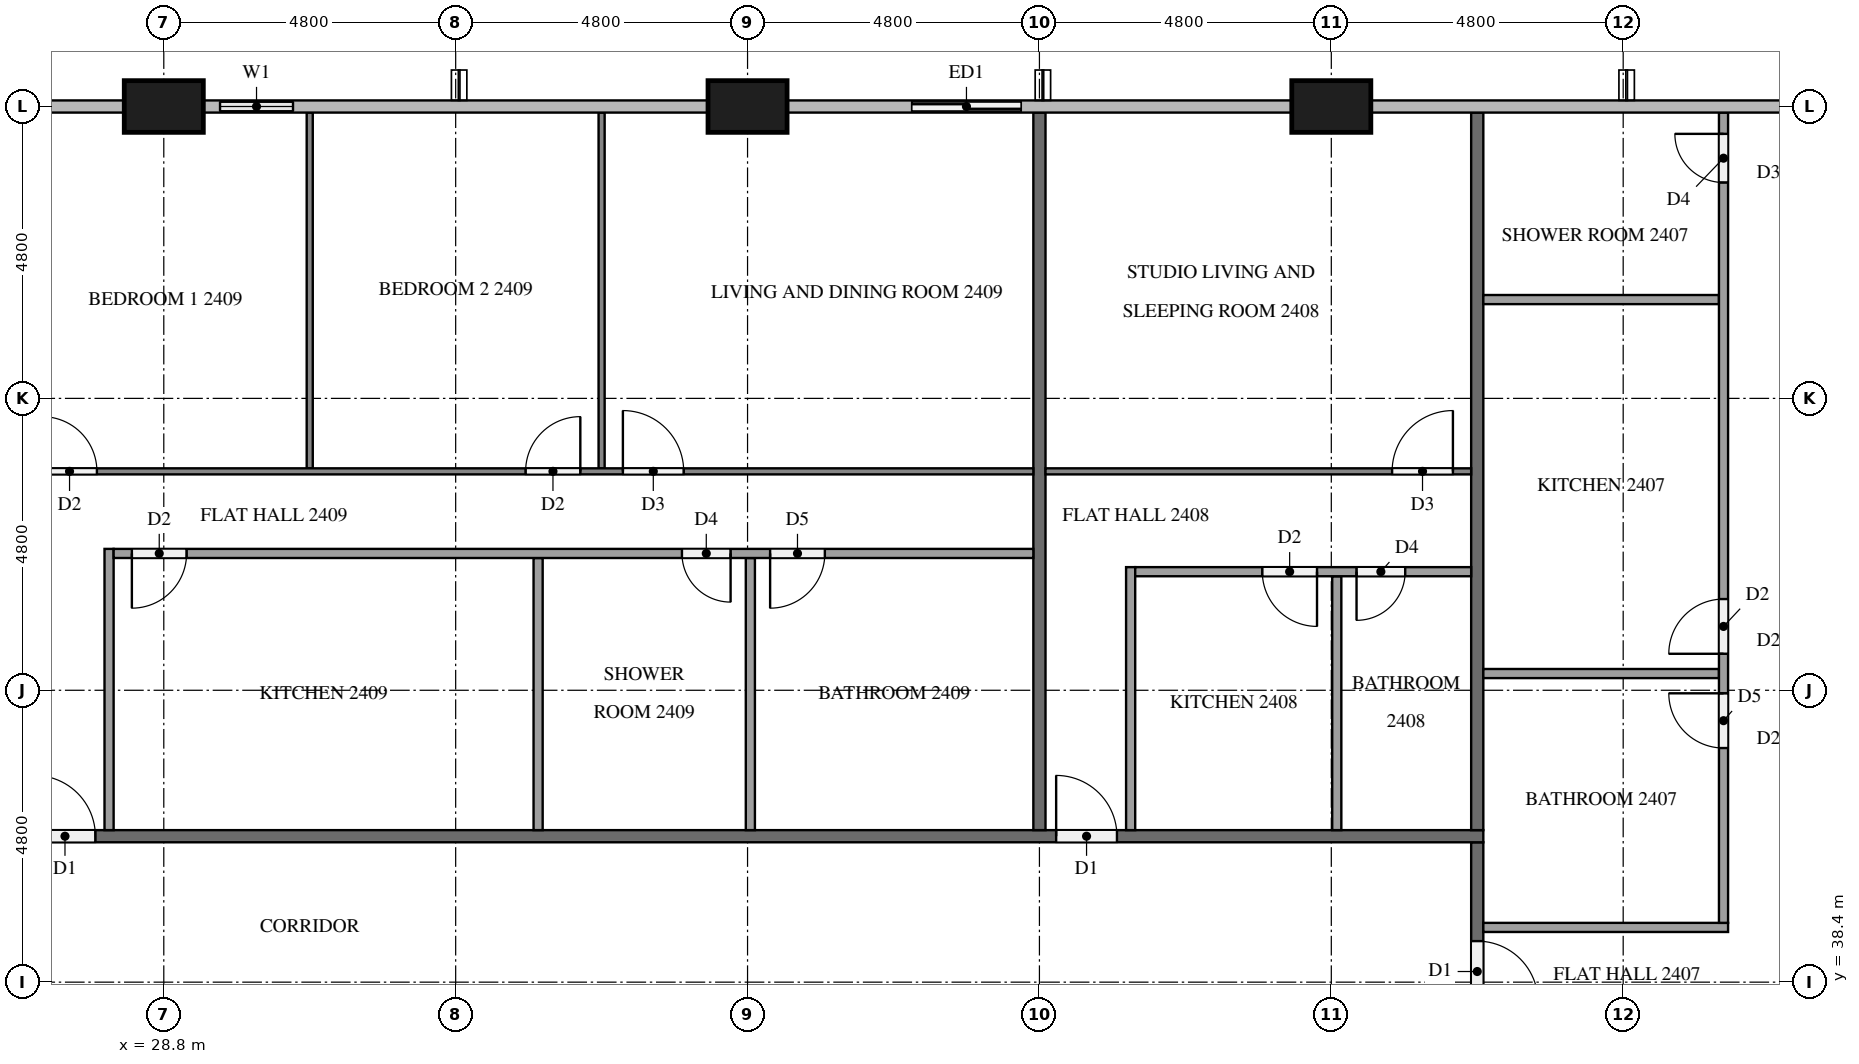
"""IFC4 building model, lengths in metres.
Left out: names, types, materials, properties, quantities, classifications, styles, units other than length and angle.
Written with IfcOpenShell. Run it as: python <this file> out.ifc"""

import sys

from ifc_helpers import new_model, si_unit, direction, frame, frame_2d, origin, origin_2d, place, context, subcontext, project, spatial, rectangle, extrude, element, fill, save


model = new_model("IFC4")
c1 = context("Model", 3, precision=1e-05, world=origin(), true_north=direction((0.0, 1.0)))
c2 = subcontext(c1, "Body", "Model", "MODEL_VIEW")
j1 = project(units=[si_unit("LENGTHUNIT", "METRE"), si_unit("PLANEANGLEUNIT", "RADIAN")], contexts=[c1])
p1 = place(None, origin())
s1 = spatial("IfcSite", under=j1, at=p1, CompositionType="ELEMENT")
p2 = place(p1, origin())
s2 = spatial("IfcBuilding", under=s1, at=p2, CompositionType="ELEMENT")
p3 = place(p2, frame((0.0, 0.0, 96.2)))
s3 = spatial("IfcBuildingStorey", under=s2, at=p3, CompositionType="ELEMENT", Elevation=96.2)
for number, where, z_axis, x_axis in (
    (1, (48.0, 52.8, 0.0), (0.0, 0.0, 1.0), (1.0, 0.0, 0.0)),
    (2, (38.4, 52.8, 0.0), (0.0, 0.0, 1.0), (1.0, 0.0, 0.0)),
    (3, (28.8, 52.8, 0.0), (0.0, 0.0, 1.0), (1.0, 0.0, 0.0)),
):
    element("IfcColumn", number, at=place(p3, frame(where, z_axis=z_axis, x_axis=x_axis)), inside=s3, PredefinedType="COLUMN", context=c2, shape_type="SweptSolid", body=[
        extrude(rectangle(XDim=1.3, YDim=0.85, at=origin_2d()), origin(), (0.0, 0.0, 1.0), 3.2),
    ])
p4 = place(p3, frame((43.2, 52.8, 0.0), z_axis=(0.0, 0.0, 1.0), x_axis=(-1.0, 0.0, 0.0)))
e4 = element("IfcWall", 4, at=p4, inside=s3, PredefinedType="SOLIDWALL", context=c2, shape_type="SweptSolid", body=[
    extrude(rectangle(XDim=2.4, YDim=0.15, at=frame_2d((1.2, 0.0))), origin(), (0.0, 0.0, 1.0), 3.2),
])
p5 = place(p4, frame((0.3, 0.0, 0.0)))
e5 = element("IfcOpeningElement", 5, at=p5, cuts=e4, PredefinedType="OPENING", context=c2, shape_type="SweptSolid", body=[
    extrude(rectangle(XDim=1.8, YDim=2.4, at=frame_2d((0.9, 1.2))), frame((0.0, 0.085, 0.0), z_axis=(0.0, -1.0, 0.0), x_axis=(1.0, 0.0, 0.0)), (0.0, 0.0, 1.0), 0.17),
])
p6 = place(p3, frame((31.2, 52.8, 0.0), z_axis=(0.0, 0.0, 1.0), x_axis=(-1.0, 0.0, 0.0)))
e6 = element("IfcWall", 6, at=p6, inside=s3, PredefinedType="SOLIDWALL", context=c2, shape_type="SweptSolid", body=[
    extrude(rectangle(XDim=1.75, YDim=0.15, at=frame_2d((0.875, 0.0))), origin(), (0.0, 0.0, 1.0), 3.2),
])
p7 = place(p6, frame((0.275, 0.0, 0.9)))
e7 = element("IfcOpeningElement", 7, at=p7, cuts=e6, PredefinedType="OPENING", context=c2, shape_type="SweptSolid", body=[
    extrude(rectangle(XDim=1.2, YDim=1.4, at=frame_2d((0.6, 0.7))), frame((0.0, 0.085, 0.0), z_axis=(0.0, -1.0, 0.0), x_axis=(1.0, 0.0, 0.0)), (0.0, 0.0, 1.0), 0.17),
])
p8 = place(p3, frame((50.4, 40.7, 0.0), z_axis=(0.0, 0.0, 1.0), x_axis=(0.0, -1.0, 0.0)))
e8 = element("IfcWall", 8, at=p8, inside=s3, PredefinedType="PARTITIONING", context=c2, shape_type="SweptSolid", body=[
    extrude(rectangle(XDim=2.8, YDim=0.2, at=frame_2d((1.4, 0.0))), origin(), (0.0, 0.0, 1.0), 3.2),
])
p9 = place(p8, frame((1.625, 0.0, 0.0)))
e9 = element("IfcOpeningElement", 9, at=p9, cuts=e8, PredefinedType="OPENING", context=c2, shape_type="SweptSolid", body=[
    extrude(rectangle(XDim=1.0, YDim=2.1, at=frame_2d((0.5, 1.05))), frame((0.0, 0.11, 0.0), z_axis=(0.0, -1.0, 0.0), x_axis=(1.0, 0.0, 0.0)), (0.0, 0.0, 1.0), 0.22),
])
p10 = place(p3, frame((11.9, 40.8, 0.0), z_axis=(0.0, 0.0, 1.0), x_axis=(1.0, 0.0, 0.0)))
e10 = element("IfcWall", 10, at=p10, inside=s3, PredefinedType="PARTITIONING", context=c2, shape_type="SweptSolid", body=[
    extrude(rectangle(XDim=38.6, YDim=0.2, at=frame_2d((19.3, 0.0))), origin(), (0.0, 0.0, 1.0), 3.2),
])
p11 = place(p10, frame((31.575, 0.0, 0.0)))
e11 = element("IfcOpeningElement", 11, at=p11, cuts=e10, PredefinedType="OPENING", context=c2, shape_type="SweptSolid", body=[
    extrude(rectangle(XDim=1.0, YDim=2.1, at=frame_2d((0.5, 1.05))), frame((0.0, 0.11, 0.0), z_axis=(0.0, -1.0, 0.0), x_axis=(1.0, 0.0, 0.0)), (0.0, 0.0, 1.0), 0.22),
])
p12 = place(p10, frame((14.775, 0.0, 0.0)))
e12 = element("IfcOpeningElement", 12, at=p12, cuts=e10, PredefinedType="OPENING", context=c2, shape_type="SweptSolid", body=[
    extrude(rectangle(XDim=1.0, YDim=2.1, at=frame_2d((0.5, 1.05))), frame((0.0, 0.11, 0.0), z_axis=(0.0, -1.0, 0.0), x_axis=(1.0, 0.0, 0.0)), (0.0, 0.0, 1.0), 0.22),
])
p13 = place(p10, frame((0.375, 0.0, 0.0)))
e13 = element("IfcOpeningElement", 13, at=p13, cuts=e10, PredefinedType="OPENING", context=c2, shape_type="SweptSolid", body=[
    extrude(rectangle(XDim=1.0, YDim=2.1, at=frame_2d((0.5, 1.05))), frame((0.0, 0.11, 0.0), z_axis=(0.0, -1.0, 0.0), x_axis=(1.0, 0.0, 0.0)), (0.0, 0.0, 1.0), 0.22),
])
for number, where, z_axis, x_axis in (
    (14, (50.4, 40.9, 0.0), (0.0, 0.0, 1.0), (0.0, 1.0, 0.0)),
    (15, (43.2, 52.7, 0.0), (0.0, 0.0, 1.0), (0.0, -1.0, 0.0)),
):
    element("IfcWall", number, at=place(p3, frame(where, z_axis=z_axis, x_axis=x_axis)), inside=s3, PredefinedType="PARTITIONING", context=c2, shape_type="SweptSolid", body=[
        extrude(rectangle(XDim=11.8, YDim=0.2, at=frame_2d((5.9, 0.0))), origin(), (0.0, 0.0, 1.0), 3.2),
    ])
for number, where, z_axis, x_axis in (
    (16, (50.5, 43.475, 0.0), (0.0, 0.0, 1.0), (1.0, 0.0, 0.0)),
    (17, (50.5, 49.625, 0.0), (0.0, 0.0, 1.0), (1.0, 0.0, 0.0)),
):
    element("IfcWall", number, at=place(p3, frame(where, z_axis=z_axis, x_axis=x_axis)), inside=s3, PredefinedType="PARTITIONING", context=c2, shape_type="SweptSolid", body=[
        extrude(rectangle(XDim=3.875, YDim=0.15, at=frame_2d((1.938, 0.0))), origin(), (0.0, 0.0, 1.0), 3.2),
    ])
p14 = place(p3, frame((50.5, 39.3, 0.0), z_axis=(0.0, 0.0, 1.0), x_axis=(1.0, 0.0, 0.0)))
e18 = element("IfcWall", 18, at=p14, inside=s3, PredefinedType="PARTITIONING", context=c2, shape_type="SweptSolid", body=[
    extrude(rectangle(XDim=4.025, YDim=0.15, at=frame_2d((2.012, 0.0))), origin(), (0.0, 0.0, 1.0), 3.2),
])
p15 = place(p3, frame((54.45, 39.375, 0.0), z_axis=(0.0, 0.0, 1.0), x_axis=(0.0, 1.0, 0.0)))
e19 = element("IfcWall", 19, at=p15, inside=s3, PredefinedType="PARTITIONING", context=c2, shape_type="SweptSolid", body=[
    extrude(rectangle(XDim=13.325, YDim=0.15, at=frame_2d((6.663, 0.0))), origin(), (0.0, 0.0, 1.0), 3.2),
])
p16 = place(p15, frame((2.875, 0.0, 0.0)))
e20 = element("IfcOpeningElement", 20, at=p16, cuts=e19, PredefinedType="OPENING", context=c2, shape_type="SweptSolid", body=[
    extrude(rectangle(XDim=0.9, YDim=2.1, at=frame_2d((0.45, 1.05))), frame((0.0, 0.085, 0.0), z_axis=(0.0, -1.0, 0.0), x_axis=(1.0, 0.0, 0.0)), (0.0, 0.0, 1.0), 0.17),
])
p17 = place(p15, frame((4.425, 0.0, 0.0)))
e21 = element("IfcOpeningElement", 21, at=p17, cuts=e19, PredefinedType="OPENING", context=c2, shape_type="SweptSolid", body=[
    extrude(rectangle(XDim=0.9, YDim=2.1, at=frame_2d((0.45, 1.05))), frame((0.0, 0.085, 0.0), z_axis=(0.0, -1.0, 0.0), x_axis=(1.0, 0.0, 0.0)), (0.0, 0.0, 1.0), 0.17),
])
p18 = place(p15, frame((12.175, 0.0, 0.0)))
e22 = element("IfcOpeningElement", 22, at=p18, cuts=e19, PredefinedType="OPENING", context=c2, shape_type="SweptSolid", body=[
    extrude(rectangle(XDim=0.8, YDim=2.1, at=frame_2d((0.4, 1.05))), frame((0.0, 0.085, 0.0), z_axis=(0.0, -1.0, 0.0), x_axis=(1.0, 0.0, 0.0)), (0.0, 0.0, 1.0), 0.17),
])
p19 = place(p3, frame((43.3, 46.8, 0.0), z_axis=(0.0, 0.0, 1.0), x_axis=(1.0, 0.0, 0.0)))
e23 = element("IfcWall", 23, at=p19, inside=s3, PredefinedType="PARTITIONING", context=c2, shape_type="SweptSolid", body=[
    extrude(rectangle(XDim=7.0, YDim=0.1, at=frame_2d((3.5, 0.0))), origin(), (0.0, 0.0, 1.0), 3.2),
])
p20 = place(p19, frame((5.7, 0.0, 0.0)))
e24 = element("IfcOpeningElement", 24, at=p20, cuts=e23, PredefinedType="OPENING", context=c2, shape_type="SweptSolid", body=[
    extrude(rectangle(XDim=1.0, YDim=2.1, at=frame_2d((0.5, 1.05))), frame((0.0, 0.06, 0.0), z_axis=(0.0, -1.0, 0.0), x_axis=(1.0, 0.0, 0.0)), (0.0, 0.0, 1.0), 0.12),
])
p21 = place(p3, frame((48.09, 40.9, 0.0), z_axis=(0.0, 0.0, 1.0), x_axis=(0.0, 1.0, 0.0)))
e25 = element("IfcWall", 25, at=p21, inside=s3, PredefinedType="PARTITIONING", context=c2, shape_type="SweptSolid", body=[
    extrude(rectangle(XDim=4.175, YDim=0.15, at=frame_2d((2.087, 0.0))), origin(), (0.0, 0.0, 1.0), 3.2),
])
p22 = place(p3, frame((44.7, 40.9, 0.0), z_axis=(0.0, 0.0, 1.0), x_axis=(0.0, 1.0, 0.0)))
e26 = element("IfcWall", 26, at=p22, inside=s3, PredefinedType="PARTITIONING", context=c2, shape_type="SweptSolid", body=[
    extrude(rectangle(XDim=4.325, YDim=0.15, at=frame_2d((2.163, 0.0))), origin(), (0.0, 0.0, 1.0), 3.2),
])
p23 = place(p3, frame((50.3, 45.15, 0.0), z_axis=(0.0, 0.0, 1.0), x_axis=(-1.0, 0.0, 0.0)))
e27 = element("IfcWall", 27, at=p23, inside=s3, PredefinedType="PARTITIONING", context=c2, shape_type="SweptSolid", body=[
    extrude(rectangle(XDim=5.525, YDim=0.15, at=frame_2d((2.763, 0.0))), origin(), (0.0, 0.0, 1.0), 3.2),
])
p24 = place(p23, frame((2.535, 0.0, 0.0)))
e28 = element("IfcOpeningElement", 28, at=p24, cuts=e27, PredefinedType="OPENING", context=c2, shape_type="SweptSolid", body=[
    extrude(rectangle(XDim=0.9, YDim=2.1, at=frame_2d((0.45, 1.05))), frame((0.0, 0.085, 0.0), z_axis=(0.0, -1.0, 0.0), x_axis=(1.0, 0.0, 0.0)), (0.0, 0.0, 1.0), 0.17),
])
p25 = place(p23, frame((1.085, 0.0, 0.0)))
e29 = element("IfcOpeningElement", 29, at=p25, cuts=e27, PredefinedType="OPENING", context=c2, shape_type="SweptSolid", body=[
    extrude(rectangle(XDim=0.8, YDim=2.1, at=frame_2d((0.4, 1.05))), frame((0.0, 0.085, 0.0), z_axis=(0.0, -1.0, 0.0), x_axis=(1.0, 0.0, 0.0)), (0.0, 0.0, 1.0), 0.17),
])
for number, where, z_axis, x_axis in (
    (30, (31.2, 46.85, 0.0), (0.0, 0.0, 1.0), (0.0, 1.0, 0.0)),
    (31, (36.0, 46.85, 0.0), (0.0, 0.0, 1.0), (0.0, 1.0, 0.0)),
):
    element("IfcWall", number, at=place(p3, frame(where, z_axis=z_axis, x_axis=x_axis)), inside=s3, PredefinedType="PARTITIONING", context=c2, shape_type="SweptSolid", body=[
        extrude(rectangle(XDim=5.85, YDim=0.1, at=frame_2d((2.925, 0.0))), origin(), (0.0, 0.0, 1.0), 3.2),
    ])
p26 = place(p3, frame((26.5, 46.8, 0.0), z_axis=(0.0, 0.0, 1.0), x_axis=(1.0, 0.0, 0.0)))
e32 = element("IfcWall", 32, at=p26, inside=s3, PredefinedType="PARTITIONING", context=c2, shape_type="SweptSolid", body=[
    extrude(rectangle(XDim=16.6, YDim=0.1, at=frame_2d((8.3, 0.0))), origin(), (0.0, 0.0, 1.0), 3.2),
])
p27 = place(p26, frame((0.3, 0.0, 0.0)))
e33 = element("IfcOpeningElement", 33, at=p27, cuts=e32, PredefinedType="OPENING", context=c2, shape_type="SweptSolid", body=[
    extrude(rectangle(XDim=0.9, YDim=2.1, at=frame_2d((0.45, 1.05))), frame((0.0, 0.06, 0.0), z_axis=(0.0, -1.0, 0.0), x_axis=(1.0, 0.0, 0.0)), (0.0, 0.0, 1.0), 0.12),
])
p28 = place(p26, frame((8.25, 0.0, 0.0)))
e34 = element("IfcOpeningElement", 34, at=p28, cuts=e32, PredefinedType="OPENING", context=c2, shape_type="SweptSolid", body=[
    extrude(rectangle(XDim=0.9, YDim=2.1, at=frame_2d((0.45, 1.05))), frame((0.0, 0.06, 0.0), z_axis=(0.0, -1.0, 0.0), x_axis=(1.0, 0.0, 0.0)), (0.0, 0.0, 1.0), 0.12),
])
p29 = place(p26, frame((9.85, 0.0, 0.0)))
e35 = element("IfcOpeningElement", 35, at=p29, cuts=e32, PredefinedType="OPENING", context=c2, shape_type="SweptSolid", body=[
    extrude(rectangle(XDim=1.0, YDim=2.1, at=frame_2d((0.5, 1.05))), frame((0.0, 0.06, 0.0), z_axis=(0.0, -1.0, 0.0), x_axis=(1.0, 0.0, 0.0)), (0.0, 0.0, 1.0), 0.12),
])
for number, where, z_axis, x_axis in (
    (36, (34.956, 40.9, 0.0), (0.0, 0.0, 1.0), (0.0, 1.0, 0.0)),
    (37, (38.446, 40.9, 0.0), (0.0, 0.0, 1.0), (0.0, 1.0, 0.0)),
):
    element("IfcWall", number, at=place(p3, frame(where, z_axis=z_axis, x_axis=x_axis)), inside=s3, PredefinedType="PARTITIONING", context=c2, shape_type="SweptSolid", body=[
        extrude(rectangle(XDim=4.475, YDim=0.15, at=frame_2d((2.238, 0.0))), origin(), (0.0, 0.0, 1.0), 3.2),
    ])
p30 = place(p3, frame((27.9, 40.9, 0.0), z_axis=(0.0, 0.0, 1.0), x_axis=(0.0, 1.0, 0.0)))
e38 = element("IfcWall", 38, at=p30, inside=s3, PredefinedType="PARTITIONING", context=c2, shape_type="SweptSolid", body=[
    extrude(rectangle(XDim=4.625, YDim=0.15, at=frame_2d((2.312, 0.0))), origin(), (0.0, 0.0, 1.0), 3.2),
])
p31 = place(p3, frame((43.1, 45.45, 0.0), z_axis=(0.0, 0.0, 1.0), x_axis=(-1.0, 0.0, 0.0)))
e39 = element("IfcWall", 39, at=p31, inside=s3, PredefinedType="PARTITIONING", context=c2, shape_type="SweptSolid", body=[
    extrude(rectangle(XDim=15.125, YDim=0.15, at=frame_2d((7.562, 0.0))), origin(), (0.0, 0.0, 1.0), 3.2),
])
p32 = place(p31, frame((13.925, 0.0, 0.0)))
e40 = element("IfcOpeningElement", 40, at=p32, cuts=e39, PredefinedType="OPENING", context=c2, shape_type="SweptSolid", body=[
    extrude(rectangle(XDim=0.9, YDim=2.1, at=frame_2d((0.45, 1.05))), frame((0.0, 0.085, 0.0), z_axis=(0.0, -1.0, 0.0), x_axis=(1.0, 0.0, 0.0)), (0.0, 0.0, 1.0), 0.17),
])
p33 = place(p31, frame((4.979, 0.0, 0.0)))
e41 = element("IfcOpeningElement", 41, at=p33, cuts=e39, PredefinedType="OPENING", context=c2, shape_type="SweptSolid", body=[
    extrude(rectangle(XDim=0.8, YDim=2.1, at=frame_2d((0.4, 1.05))), frame((0.0, 0.085, 0.0), z_axis=(0.0, -1.0, 0.0), x_axis=(1.0, 0.0, 0.0)), (0.0, 0.0, 1.0), 0.17),
])
p34 = place(p31, frame((3.429, 0.0, 0.0)))
e42 = element("IfcOpeningElement", 42, at=p34, cuts=e39, PredefinedType="OPENING", context=c2, shape_type="SweptSolid", body=[
    extrude(rectangle(XDim=0.9, YDim=2.1, at=frame_2d((0.45, 1.05))), frame((0.0, 0.085, 0.0), z_axis=(0.0, -1.0, 0.0), x_axis=(1.0, 0.0, 0.0)), (0.0, 0.0, 1.0), 0.17),
])
p35 = place(p5, origin())
e43 = element("IfcDoor", 43, at=p35, inside=s3, OperationType="SLIDING_TO_RIGHT", PredefinedType="DOOR", context=c2, shape_type="SweptSolid", body=[
    extrude(rectangle(XDim=1.8, YDim=2.4, at=frame_2d((0.9, 1.2))), frame((0.0, 0.025, 0.0), z_axis=(0.0, -1.0, 0.0), x_axis=(1.0, 0.0, 0.0)), (0.0, 0.0, 1.0), 0.05),
])
fill(e5, e43)
p36 = place(p7, origin())
e44 = element("IfcWindow", 44, at=p36, inside=s3, PartitioningType="SINGLE_PANEL", PredefinedType="WINDOW", context=c2, shape_type="SweptSolid", body=[
    extrude(rectangle(XDim=1.2, YDim=1.4, at=frame_2d((0.6, 0.7))), frame((0.0, 0.03, 0.0), z_axis=(0.0, -1.0, 0.0), x_axis=(1.0, 0.0, 0.0)), (0.0, 0.0, 1.0), 0.06),
])
fill(e7, e44)
p37 = place(p9, origin())
e45 = element("IfcDoor", 45, at=p37, inside=s3, OperationType="SINGLE_SWING_RIGHT", PredefinedType="DOOR", context=c2, shape_type="SweptSolid", body=[
    extrude(rectangle(XDim=1.0, YDim=2.1, at=frame_2d((0.5, 1.05))), frame((0.0, 0.025, 0.0), z_axis=(0.0, -1.0, 0.0), x_axis=(1.0, 0.0, 0.0)), (0.0, 0.0, 1.0), 0.05),
])
fill(e9, e45)
p38 = place(p11, origin())
e46 = element("IfcDoor", 46, at=p38, inside=s3, OperationType="SINGLE_SWING_LEFT", PredefinedType="DOOR", context=c2, shape_type="SweptSolid", body=[
    extrude(rectangle(XDim=1.0, YDim=2.1, at=frame_2d((0.5, 1.05))), frame((0.0, 0.025, 0.0), z_axis=(0.0, -1.0, 0.0), x_axis=(1.0, 0.0, 0.0)), (0.0, 0.0, 1.0), 0.05),
])
fill(e11, e46)
p39 = place(p12, origin())
e47 = element("IfcDoor", 47, at=p39, inside=s3, OperationType="SINGLE_SWING_LEFT", PredefinedType="DOOR", context=c2, shape_type="SweptSolid", body=[
    extrude(rectangle(XDim=1.0, YDim=2.1, at=frame_2d((0.5, 1.05))), frame((0.0, 0.025, 0.0), z_axis=(0.0, -1.0, 0.0), x_axis=(1.0, 0.0, 0.0)), (0.0, 0.0, 1.0), 0.05),
])
fill(e12, e47)
p40 = place(p16, origin())
e48 = element("IfcDoor", 48, at=p40, inside=s3, OperationType="SINGLE_SWING_RIGHT", PredefinedType="DOOR", context=c2, shape_type="SweptSolid", body=[
    extrude(rectangle(XDim=0.9, YDim=2.1, at=frame_2d((0.45, 1.05))), frame((0.0, 0.025, 0.0), z_axis=(0.0, -1.0, 0.0), x_axis=(1.0, 0.0, 0.0)), (0.0, 0.0, 1.0), 0.05),
])
fill(e20, e48)
p41 = place(p17, origin())
e49 = element("IfcDoor", 49, at=p41, inside=s3, OperationType="SINGLE_SWING_LEFT", PredefinedType="DOOR", context=c2, shape_type="SweptSolid", body=[
    extrude(rectangle(XDim=0.9, YDim=2.1, at=frame_2d((0.45, 1.05))), frame((0.0, 0.025, 0.0), z_axis=(0.0, -1.0, 0.0), x_axis=(1.0, 0.0, 0.0)), (0.0, 0.0, 1.0), 0.05),
])
fill(e21, e49)
p42 = place(p18, origin())
e50 = element("IfcDoor", 50, at=p42, inside=s3, OperationType="SINGLE_SWING_RIGHT", PredefinedType="DOOR", context=c2, shape_type="SweptSolid", body=[
    extrude(rectangle(XDim=0.8, YDim=2.1, at=frame_2d((0.4, 1.05))), frame((0.0, 0.025, 0.0), z_axis=(0.0, -1.0, 0.0), x_axis=(1.0, 0.0, 0.0)), (0.0, 0.0, 1.0), 0.05),
])
fill(e22, e50)
p43 = place(p20, origin())
e51 = element("IfcDoor", 51, at=p43, inside=s3, OperationType="SINGLE_SWING_RIGHT", PredefinedType="DOOR", context=c2, shape_type="SweptSolid", body=[
    extrude(rectangle(XDim=1.0, YDim=2.1, at=frame_2d((0.5, 1.05))), frame((0.0, 0.025, 0.0), z_axis=(0.0, -1.0, 0.0), x_axis=(1.0, 0.0, 0.0)), (0.0, 0.0, 1.0), 0.05),
])
fill(e24, e51)
p44 = place(p24, origin())
e52 = element("IfcDoor", 52, at=p44, inside=s3, OperationType="SINGLE_SWING_LEFT", PredefinedType="DOOR", context=c2, shape_type="SweptSolid", body=[
    extrude(rectangle(XDim=0.9, YDim=2.1, at=frame_2d((0.45, 1.05))), frame((0.0, 0.025, 0.0), z_axis=(0.0, -1.0, 0.0), x_axis=(1.0, 0.0, 0.0)), (0.0, 0.0, 1.0), 0.05),
])
fill(e28, e52)
p45 = place(p25, origin())
e53 = element("IfcDoor", 53, at=p45, inside=s3, OperationType="SINGLE_SWING_RIGHT", PredefinedType="DOOR", context=c2, shape_type="SweptSolid", body=[
    extrude(rectangle(XDim=0.8, YDim=2.1, at=frame_2d((0.4, 1.05))), frame((0.0, 0.025, 0.0), z_axis=(0.0, -1.0, 0.0), x_axis=(1.0, 0.0, 0.0)), (0.0, 0.0, 1.0), 0.05),
])
fill(e29, e53)
p46 = place(p27, origin())
e54 = element("IfcDoor", 54, at=p46, inside=s3, OperationType="SINGLE_SWING_LEFT", PredefinedType="DOOR", context=c2, shape_type="SweptSolid", body=[
    extrude(rectangle(XDim=0.9, YDim=2.1, at=frame_2d((0.45, 1.05))), frame((0.0, 0.025, 0.0), z_axis=(0.0, -1.0, 0.0), x_axis=(1.0, 0.0, 0.0)), (0.0, 0.0, 1.0), 0.05),
])
fill(e33, e54)
p47 = place(p28, origin())
e55 = element("IfcDoor", 55, at=p47, inside=s3, OperationType="SINGLE_SWING_RIGHT", PredefinedType="DOOR", context=c2, shape_type="SweptSolid", body=[
    extrude(rectangle(XDim=0.9, YDim=2.1, at=frame_2d((0.45, 1.05))), frame((0.0, 0.025, 0.0), z_axis=(0.0, -1.0, 0.0), x_axis=(1.0, 0.0, 0.0)), (0.0, 0.0, 1.0), 0.05),
])
fill(e34, e55)
p48 = place(p29, origin())
e56 = element("IfcDoor", 56, at=p48, inside=s3, OperationType="SINGLE_SWING_LEFT", PredefinedType="DOOR", context=c2, shape_type="SweptSolid", body=[
    extrude(rectangle(XDim=1.0, YDim=2.1, at=frame_2d((0.5, 1.05))), frame((0.0, 0.025, 0.0), z_axis=(0.0, -1.0, 0.0), x_axis=(1.0, 0.0, 0.0)), (0.0, 0.0, 1.0), 0.05),
])
fill(e35, e56)
p49 = place(p32, origin())
e57 = element("IfcDoor", 57, at=p49, inside=s3, OperationType="SINGLE_SWING_RIGHT", PredefinedType="DOOR", context=c2, shape_type="SweptSolid", body=[
    extrude(rectangle(XDim=0.9, YDim=2.1, at=frame_2d((0.45, 1.05))), frame((0.0, 0.025, 0.0), z_axis=(0.0, -1.0, 0.0), x_axis=(1.0, 0.0, 0.0)), (0.0, 0.0, 1.0), 0.05),
])
fill(e40, e57)
p50 = place(p33, origin())
e58 = element("IfcDoor", 58, at=p50, inside=s3, OperationType="SINGLE_SWING_LEFT", PredefinedType="DOOR", context=c2, shape_type="SweptSolid", body=[
    extrude(rectangle(XDim=0.8, YDim=2.1, at=frame_2d((0.4, 1.05))), frame((0.0, 0.025, 0.0), z_axis=(0.0, -1.0, 0.0), x_axis=(1.0, 0.0, 0.0)), (0.0, 0.0, 1.0), 0.05),
])
fill(e41, e58)
p51 = place(p34, origin())
e59 = element("IfcDoor", 59, at=p51, inside=s3, OperationType="SINGLE_SWING_RIGHT", PredefinedType="DOOR", context=c2, shape_type="SweptSolid", body=[
    extrude(rectangle(XDim=0.9, YDim=2.1, at=frame_2d((0.45, 1.05))), frame((0.0, 0.025, 0.0), z_axis=(0.0, -1.0, 0.0), x_axis=(1.0, 0.0, 0.0)), (0.0, 0.0, 1.0), 0.05),
])
fill(e42, e59)
save(model, sys.argv[1])
